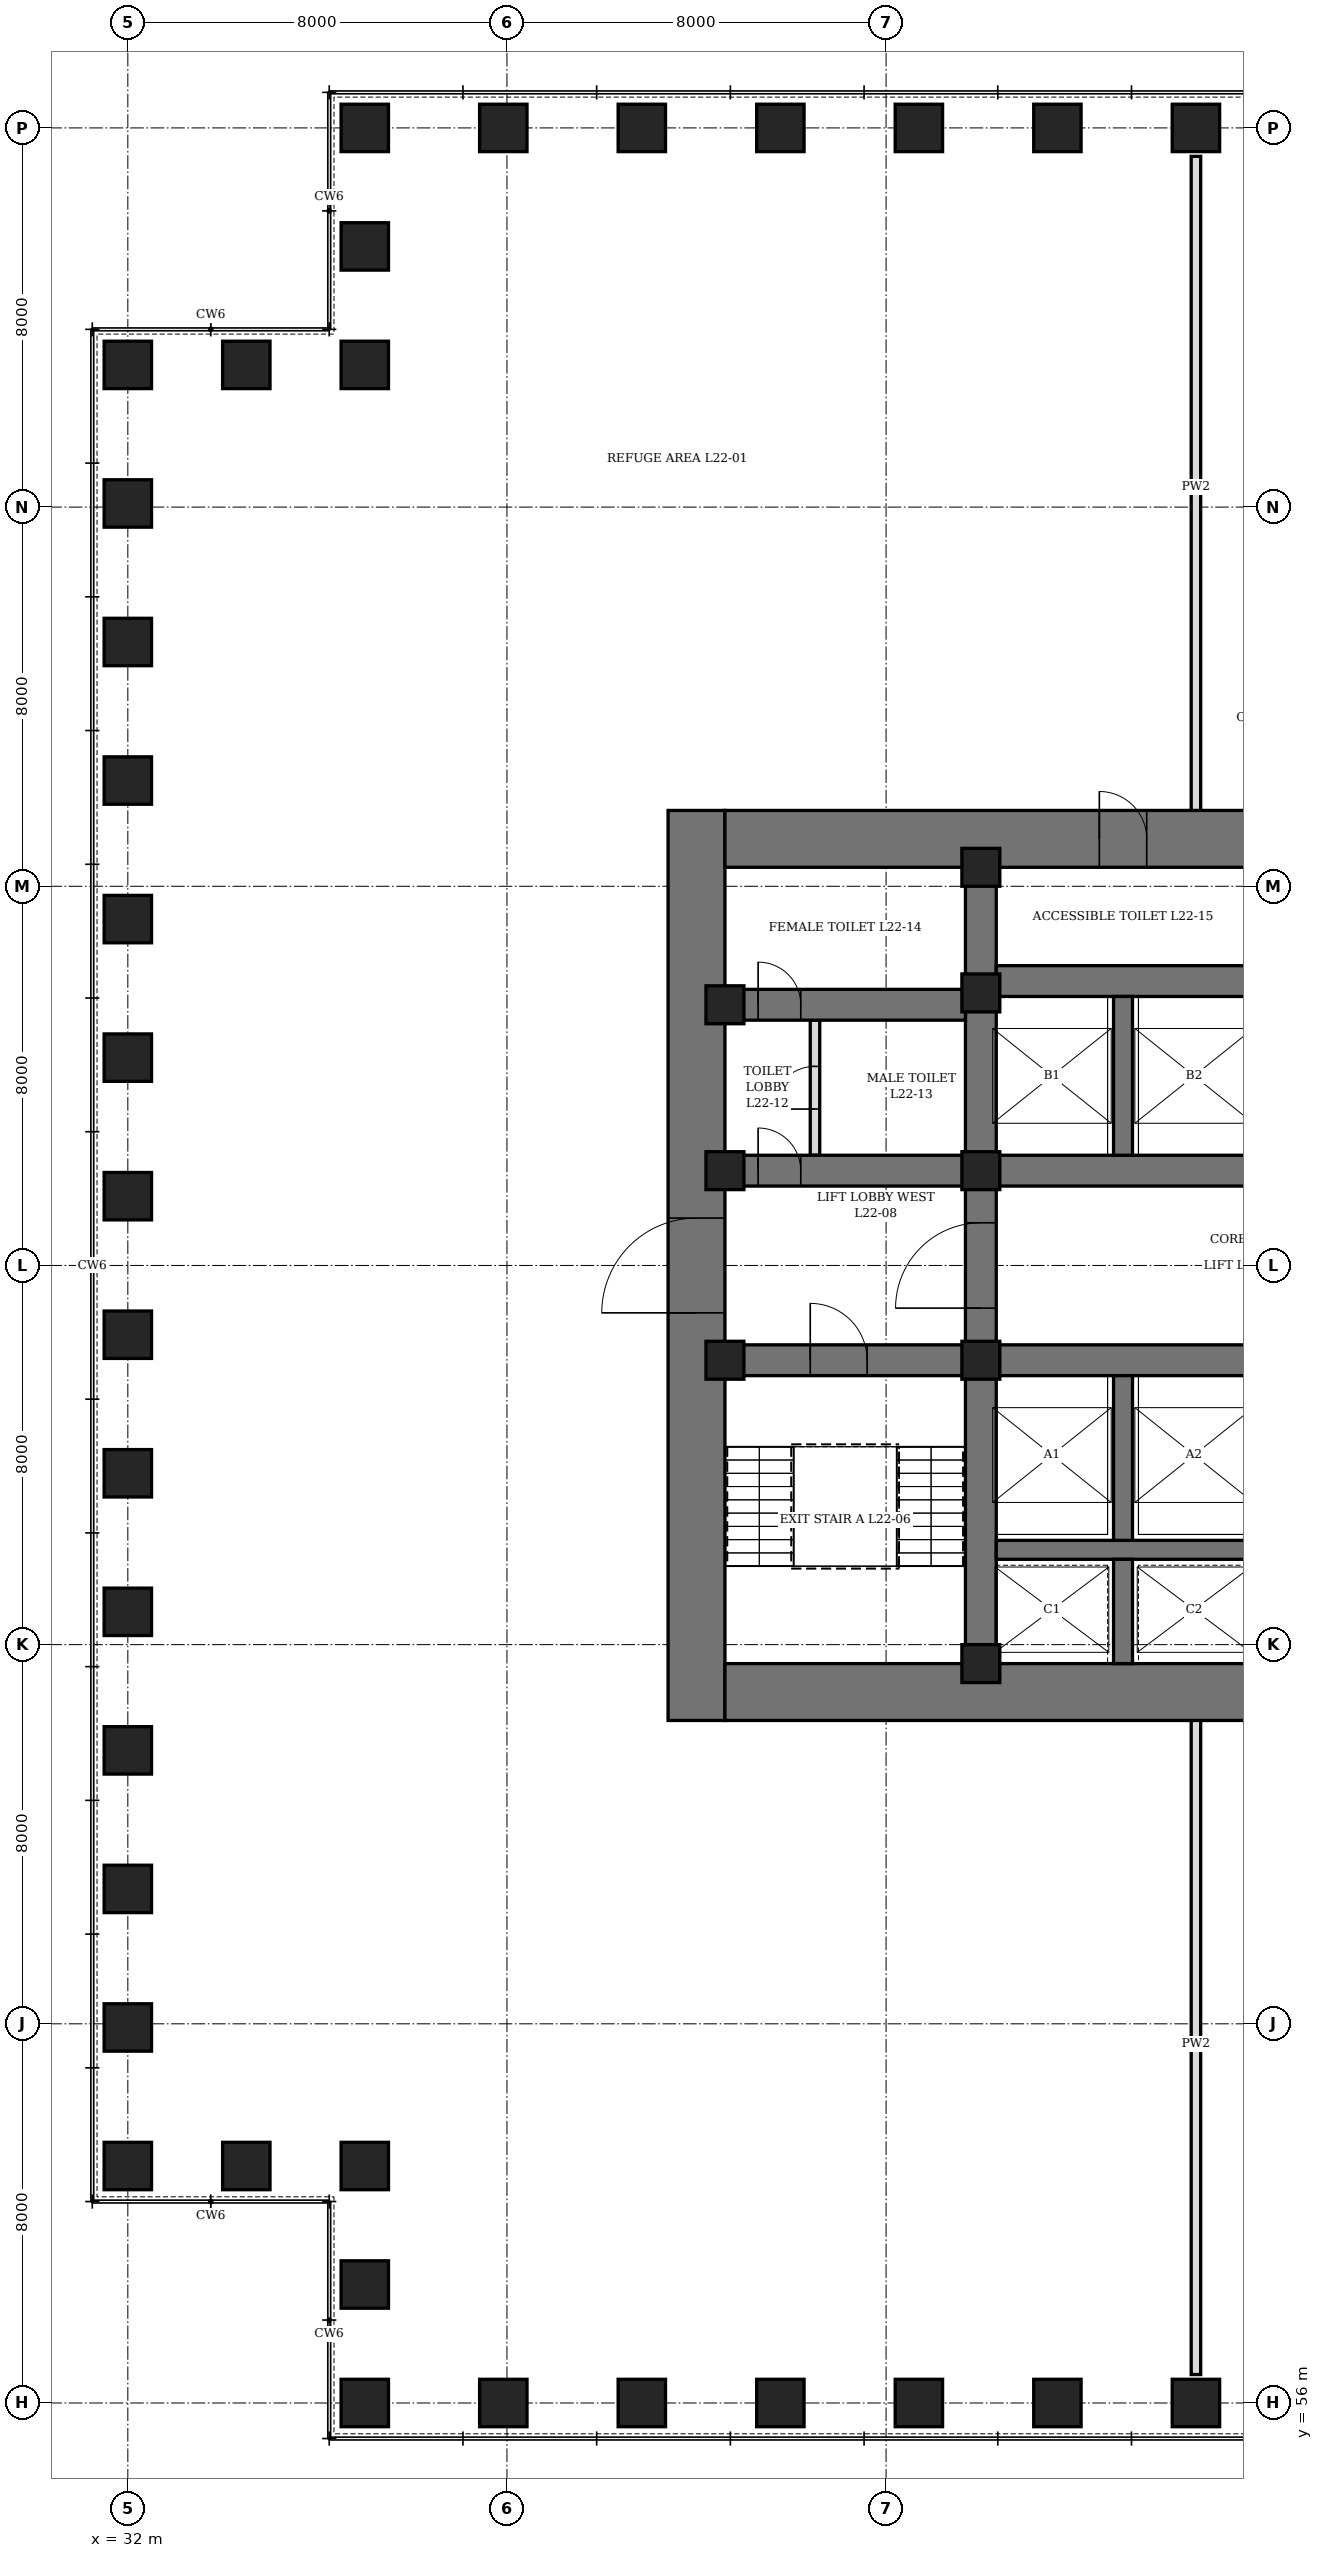
"""IFC4 building model, lengths in metres.
Left out: names, types, materials, properties, quantities, classifications, styles, units other than length and angle.
Written with IfcOpenShell. Run it as: python <this file> out.ifc"""

import sys

from ifc_helpers import new_model, si_unit, direction, frame, frame_2d, origin, origin_2d, place, context, subcontext, project, spatial, rectangle, hollow_rectangle, extrude, element, fill, save


model = new_model("IFC4")
c1 = context("Model", 3, precision=1e-05, world=origin(), true_north=direction((0.0, 1.0)))
c2 = subcontext(c1, "Body", "Model", "MODEL_VIEW")
j1 = project(units=[si_unit("LENGTHUNIT", "METRE"), si_unit("PLANEANGLEUNIT", "RADIAN")], contexts=[c1])
p1 = place(None, origin())
s1 = spatial("IfcSite", under=j1, at=p1, CompositionType="ELEMENT")
p2 = place(p1, origin())
s2 = spatial("IfcBuilding", under=s1, at=p2, CompositionType="ELEMENT")
p3 = place(p2, frame((0.0, 0.0, 102.1)))
s3 = spatial("IfcBuildingStorey", under=s2, at=p3, CompositionType="ELEMENT", Elevation=102.1)
for number, where, z_axis, x_axis in (
    (1, (37.0, 56.0, 0.0), (0.0, 0.0, 1.0), (1.0, 0.0, 0.0)),
    (2, (39.923, 56.0, 0.0), (0.0, 0.0, 1.0), (1.0, 0.0, 0.0)),
    (3, (42.846, 56.0, 0.0), (0.0, 0.0, 1.0), (1.0, 0.0, 0.0)),
    (4, (45.769, 56.0, 0.0), (0.0, 0.0, 1.0), (1.0, 0.0, 0.0)),
    (5, (48.692, 56.0, 0.0), (0.0, 0.0, 1.0), (1.0, 0.0, 0.0)),
    (6, (51.615, 56.0, 0.0), (0.0, 0.0, 1.0), (1.0, 0.0, 0.0)),
    (7, (54.539, 56.0, 0.0), (0.0, 0.0, 1.0), (1.0, 0.0, 0.0)),
    (8, (54.539, 104.0, 0.0), (0.0, 0.0, 1.0), (1.0, 0.0, 0.0)),
    (9, (51.615, 104.0, 0.0), (0.0, 0.0, 1.0), (1.0, 0.0, 0.0)),
    (10, (48.692, 104.0, 0.0), (0.0, 0.0, 1.0), (1.0, 0.0, 0.0)),
    (11, (45.769, 104.0, 0.0), (0.0, 0.0, 1.0), (1.0, 0.0, 0.0)),
    (12, (42.846, 104.0, 0.0), (0.0, 0.0, 1.0), (1.0, 0.0, 0.0)),
    (13, (39.923, 104.0, 0.0), (0.0, 0.0, 1.0), (1.0, 0.0, 0.0)),
    (14, (37.0, 104.0, 0.0), (0.0, 0.0, 1.0), (0.0, 1.0, 0.0)),
    (15, (37.0, 101.5, 0.0), (0.0, 0.0, 1.0), (0.0, 1.0, 0.0)),
    (16, (37.0, 99.0, 0.0), (0.0, 0.0, 1.0), (1.0, 0.0, 0.0)),
    (17, (34.5, 99.0, 0.0), (0.0, 0.0, 1.0), (1.0, 0.0, 0.0)),
    (18, (32.0, 99.0, 0.0), (0.0, 0.0, 1.0), (0.0, 1.0, 0.0)),
    (19, (32.0, 96.077, 0.0), (0.0, 0.0, 1.0), (0.0, 1.0, 0.0)),
    (20, (32.0, 93.154, 0.0), (0.0, 0.0, 1.0), (0.0, 1.0, 0.0)),
    (21, (32.0, 90.231, 0.0), (0.0, 0.0, 1.0), (0.0, 1.0, 0.0)),
    (22, (32.0, 87.308, 0.0), (0.0, 0.0, 1.0), (0.0, 1.0, 0.0)),
    (23, (32.0, 84.385, 0.0), (0.0, 0.0, 1.0), (0.0, 1.0, 0.0)),
    (24, (32.0, 81.461, 0.0), (0.0, 0.0, 1.0), (0.0, 1.0, 0.0)),
    (25, (32.0, 78.539, 0.0), (0.0, 0.0, 1.0), (0.0, 1.0, 0.0)),
    (26, (32.0, 75.615, 0.0), (0.0, 0.0, 1.0), (0.0, 1.0, 0.0)),
    (27, (32.0, 72.692, 0.0), (0.0, 0.0, 1.0), (0.0, 1.0, 0.0)),
    (28, (32.0, 69.769, 0.0), (0.0, 0.0, 1.0), (0.0, 1.0, 0.0)),
    (29, (32.0, 66.846, 0.0), (0.0, 0.0, 1.0), (0.0, 1.0, 0.0)),
    (30, (32.0, 63.923, 0.0), (0.0, 0.0, 1.0), (0.0, 1.0, 0.0)),
    (31, (32.0, 61.0, 0.0), (0.0, 0.0, 1.0), (1.0, 0.0, 0.0)),
    (32, (34.5, 61.0, 0.0), (0.0, 0.0, 1.0), (1.0, 0.0, 0.0)),
    (33, (37.0, 61.0, 0.0), (0.0, 0.0, 1.0), (0.0, 1.0, 0.0)),
    (34, (37.0, 58.5, 0.0), (0.0, 0.0, 1.0), (0.0, 1.0, 0.0)),
):
    element("IfcColumn", number, at=place(p3, frame(where, z_axis=z_axis, x_axis=x_axis)), inside=s3, PredefinedType="COLUMN", context=c2, shape_type="SweptSolid", body=[
        extrude(hollow_rectangle(XDim=1.0, YDim=1.0, WallThickness=0.35, at=origin_2d()), origin(), (0.0, 0.0, 1.0), 5.75),
    ])
p4 = place(p3, frame((44.0, 70.4, 0.0), z_axis=(0.0, 0.0, 1.0), x_axis=(0.0, 1.0, 0.0)))
e35 = element("IfcWall", 35, at=p4, inside=s3, PredefinedType="SHEAR", context=c2, shape_type="SweptSolid", body=[
    extrude(rectangle(XDim=19.2, YDim=1.2, at=frame_2d((9.6, 0.0))), origin(), (0.0, 0.0, 1.0), 6.0),
])
p5 = place(p4, frame((8.6, 0.0, 0.0)))
e36 = element("IfcOpeningElement", 36, at=p5, cuts=e35, PredefinedType="OPENING", context=c2, shape_type="SweptSolid", body=[
    extrude(rectangle(XDim=2.0, YDim=2.4, at=frame_2d((1.0, 1.2))), frame((0.0, 0.61, 0.0), z_axis=(0.0, -1.0, 0.0), x_axis=(1.0, 0.0, 0.0)), (0.0, 0.0, 1.0), 1.22),
])
p6 = place(p3, frame((44.6, 71.0, 0.0), z_axis=(0.0, 0.0, 1.0), x_axis=(1.0, 0.0, 0.0)))
e37 = element("IfcWall", 37, at=p6, inside=s3, PredefinedType="SHEAR", context=c2, shape_type="SweptSolid", body=[
    extrude(rectangle(XDim=22.8, YDim=1.2, at=frame_2d((11.4, 0.0))), origin(), (0.0, 0.0, 1.0), 6.0),
])
p7 = place(p3, frame((44.6, 89.0, 0.0), z_axis=(0.0, 0.0, 1.0), x_axis=(1.0, 0.0, 0.0)))
e38 = element("IfcWall", 38, at=p7, inside=s3, PredefinedType="SHEAR", context=c2, shape_type="SweptSolid", body=[
    extrude(rectangle(XDim=22.8, YDim=1.2, at=frame_2d((11.4, 0.0))), origin(), (0.0, 0.0, 1.0), 6.0),
])
p8 = place(p7, frame((7.9, 0.0, 0.0)))
e39 = element("IfcOpeningElement", 39, at=p8, cuts=e38, PredefinedType="OPENING", context=c2, shape_type="SweptSolid", body=[
    extrude(rectangle(XDim=1.0, YDim=2.1, at=frame_2d((0.5, 1.05))), frame((0.0, 0.61, 0.0), z_axis=(0.0, -1.0, 0.0), x_axis=(1.0, 0.0, 0.0)), (0.0, 0.0, 1.0), 1.22),
])
p9 = place(p7, frame((12.125, 0.0, 0.0)))
e40 = element("IfcOpeningElement", 40, at=p9, cuts=e38, PredefinedType="OPENING", context=c2, shape_type="SweptSolid", body=[
    extrude(rectangle(XDim=0.9, YDim=2.1, at=frame_2d((0.45, 1.05))), frame((0.0, 0.61, 0.0), z_axis=(0.0, -1.0, 0.0), x_axis=(1.0, 0.0, 0.0)), (0.0, 0.0, 1.0), 1.22),
])
p10 = place(p7, frame((14.012, 0.0, 0.0)))
e41 = element("IfcOpeningElement", 41, at=p10, cuts=e38, PredefinedType="OPENING", context=c2, shape_type="SweptSolid", body=[
    extrude(rectangle(XDim=0.9, YDim=2.1, at=frame_2d((0.45, 1.05))), frame((0.0, 0.61, 0.0), z_axis=(0.0, -1.0, 0.0), x_axis=(1.0, 0.0, 0.0)), (0.0, 0.0, 1.0), 1.22),
])
p11 = place(p3, frame((50.0, 71.6, 0.0), z_axis=(0.0, 0.0, 1.0), x_axis=(0.0, 1.0, 0.0)))
e42 = element("IfcWall", 42, at=p11, inside=s3, PredefinedType="SHEAR", context=c2, shape_type="SweptSolid", body=[
    extrude(rectangle(XDim=16.8, YDim=0.65, at=frame_2d((8.4, 0.0))), origin(), (0.0, 0.0, 1.0), 6.0),
])
p12 = place(p11, frame((7.5, 0.0, 0.0)))
e43 = element("IfcOpeningElement", 43, at=p12, cuts=e42, PredefinedType="OPENING", context=c2, shape_type="SweptSolid", body=[
    extrude(rectangle(XDim=1.8, YDim=2.4, at=frame_2d((0.9, 1.2))), frame((0.0, 0.335, 0.0), z_axis=(0.0, -1.0, 0.0), x_axis=(1.0, 0.0, 0.0)), (0.0, 0.0, 1.0), 0.67),
])
p13 = place(p3, frame((44.6, 78.0, 0.0), z_axis=(0.0, 0.0, 1.0), x_axis=(1.0, 0.0, 0.0)))
e44 = element("IfcWall", 44, at=p13, inside=s3, PredefinedType="SHEAR", context=c2, shape_type="SweptSolid", body=[
    extrude(rectangle(XDim=5.075, YDim=0.65, at=frame_2d((2.538, 0.0))), origin(), (0.0, 0.0, 1.0), 6.0),
])
p14 = place(p13, frame((1.8, 0.0, 0.0)))
e45 = element("IfcOpeningElement", 45, at=p14, cuts=e44, PredefinedType="OPENING", context=c2, shape_type="SweptSolid", body=[
    extrude(rectangle(XDim=1.2, YDim=2.1, at=frame_2d((0.6, 1.05))), frame((0.0, 0.335, 0.0), z_axis=(0.0, -1.0, 0.0), x_axis=(1.0, 0.0, 0.0)), (0.0, 0.0, 1.0), 0.67),
])
p15 = place(p3, frame((44.6, 82.0, 0.0), z_axis=(0.0, 0.0, 1.0), x_axis=(1.0, 0.0, 0.0)))
e46 = element("IfcWall", 46, at=p15, inside=s3, PredefinedType="SHEAR", context=c2, shape_type="SweptSolid", body=[
    extrude(rectangle(XDim=5.075, YDim=0.65, at=frame_2d((2.538, 0.0))), origin(), (0.0, 0.0, 1.0), 6.0),
])
p16 = place(p15, frame((0.7, 0.0, 0.0)))
e47 = element("IfcOpeningElement", 47, at=p16, cuts=e46, PredefinedType="OPENING", context=c2, shape_type="SweptSolid", body=[
    extrude(rectangle(XDim=0.9, YDim=2.1, at=frame_2d((0.45, 1.05))), frame((0.0, 0.335, 0.0), z_axis=(0.0, -1.0, 0.0), x_axis=(1.0, 0.0, 0.0)), (0.0, 0.0, 1.0), 0.67),
])
p17 = place(p3, frame((44.6, 85.5, 0.0), z_axis=(0.0, 0.0, 1.0), x_axis=(1.0, 0.0, 0.0)))
e48 = element("IfcWall", 48, at=p17, inside=s3, PredefinedType="SHEAR", context=c2, shape_type="SweptSolid", body=[
    extrude(rectangle(XDim=5.075, YDim=0.65, at=frame_2d((2.538, 0.0))), origin(), (0.0, 0.0, 1.0), 6.0),
])
p18 = place(p17, frame((0.7, 0.0, 0.0)))
e49 = element("IfcOpeningElement", 49, at=p18, cuts=e48, PredefinedType="OPENING", context=c2, shape_type="SweptSolid", body=[
    extrude(rectangle(XDim=0.9, YDim=2.1, at=frame_2d((0.45, 1.05))), frame((0.0, 0.335, 0.0), z_axis=(0.0, -1.0, 0.0), x_axis=(1.0, 0.0, 0.0)), (0.0, 0.0, 1.0), 0.67),
])
for number, where, z_axis, x_axis in (
    (50, (50.325, 78.0, 0.0), (0.0, 0.0, 1.0), (1.0, 0.0, 0.0)),
    (51, (50.325, 82.0, 0.0), (0.0, 0.0, 1.0), (1.0, 0.0, 0.0)),
    (52, (50.325, 86.0, 0.0), (0.0, 0.0, 1.0), (1.0, 0.0, 0.0)),
):
    element("IfcWall", number, at=place(p3, frame(where, z_axis=z_axis, x_axis=x_axis)), inside=s3, PredefinedType="SHEAR", context=c2, shape_type="SweptSolid", body=[
        extrude(rectangle(XDim=11.35, YDim=0.65, at=frame_2d((5.675, 0.0))), origin(), (0.0, 0.0, 1.0), 6.0),
    ])
p19 = place(p3, frame((50.325, 74.0, 0.0), z_axis=(0.0, 0.0, 1.0), x_axis=(1.0, 0.0, 0.0)))
e53 = element("IfcWall", 53, at=p19, inside=s3, PredefinedType="SHEAR", context=c2, shape_type="SweptSolid", body=[
    extrude(rectangle(XDim=11.35, YDim=0.4, at=frame_2d((5.675, 0.0))), origin(), (0.0, 0.0, 1.0), 6.0),
])
p20 = place(p3, frame((53.0, 71.6, 0.0), z_axis=(0.0, 0.0, 1.0), x_axis=(0.0, 1.0, 0.0)))
e54 = element("IfcWall", 54, at=p20, inside=s3, PredefinedType="SHEAR", context=c2, shape_type="SweptSolid", body=[
    extrude(rectangle(XDim=2.2, YDim=0.4, at=frame_2d((1.1, 0.0))), origin(), (0.0, 0.0, 1.0), 6.0),
])
p21 = place(p3, frame((53.0, 74.2, 0.0), z_axis=(0.0, 0.0, 1.0), x_axis=(0.0, 1.0, 0.0)))
e55 = element("IfcWall", 55, at=p21, inside=s3, PredefinedType="SHEAR", context=c2, shape_type="SweptSolid", body=[
    extrude(rectangle(XDim=3.475, YDim=0.4, at=frame_2d((1.738, 0.0))), origin(), (0.0, 0.0, 1.0), 6.0),
])
p22 = place(p3, frame((53.0, 82.325, 0.0), z_axis=(0.0, 0.0, 1.0), x_axis=(0.0, 1.0, 0.0)))
e56 = element("IfcWall", 56, at=p22, inside=s3, PredefinedType="SHEAR", context=c2, shape_type="SweptSolid", body=[
    extrude(rectangle(XDim=3.35, YDim=0.4, at=frame_2d((1.675, 0.0))), origin(), (0.0, 0.0, 1.0), 6.0),
])
for number, where, z_axis, x_axis in (
    (57, (44.6, 78.0, 0.0), (0.0, 0.0, 1.0), (1.0, 0.0, 0.0)),
    (58, (44.6, 82.0, 0.0), (0.0, 0.0, 1.0), (1.0, 0.0, 0.0)),
    (59, (44.6, 85.5, 0.0), (0.0, 0.0, 1.0), (1.0, 0.0, 0.0)),
    (60, (50.0, 71.6, 0.0), (0.0, 0.0, 1.0), (1.0, 0.0, 0.0)),
    (61, (50.0, 78.0, 0.0), (0.0, 0.0, 1.0), (1.0, 0.0, 0.0)),
    (62, (50.0, 82.0, 0.0), (0.0, 0.0, 1.0), (1.0, 0.0, 0.0)),
    (63, (50.0, 85.75, 0.0), (0.0, 0.0, 1.0), (1.0, 0.0, 0.0)),
    (64, (50.0, 88.4, 0.0), (0.0, 0.0, 1.0), (1.0, 0.0, 0.0)),
):
    element("IfcColumn", number, at=place(p3, frame(where, z_axis=z_axis, x_axis=x_axis)), inside=s3, PredefinedType="COLUMN", context=c2, shape_type="SweptSolid", body=[
        extrude(hollow_rectangle(XDim=0.8, YDim=0.8, WallThickness=0.1, at=origin_2d()), origin(), (0.0, 0.0, 1.0), 6.0),
    ])
p23 = place(p3, frame((46.5, 82.325, 0.0), z_axis=(0.0, 0.0, 1.0), x_axis=(0.0, 1.0, 0.0)))
e65 = element("IfcWall", 65, at=p23, inside=s3, PredefinedType="PARTITIONING", context=c2, shape_type="SweptSolid", body=[
    extrude(rectangle(XDim=2.85, YDim=0.2, at=frame_2d((1.425, 0.0))), origin(), (0.0, 0.0, 1.0), 5.75),
])
p24 = place(p23, frame((0.975, 0.0, 0.0)))
e66 = element("IfcOpeningElement", 66, at=p24, cuts=e65, PredefinedType="OPENING", context=c2, shape_type="SweptSolid", body=[
    extrude(rectangle(XDim=0.9, YDim=2.1, at=frame_2d((0.45, 1.05))), frame((0.0, 0.11, 0.0), z_axis=(0.0, -1.0, 0.0), x_axis=(1.0, 0.0, 0.0)), (0.0, 0.0, 1.0), 0.22),
])
for number, where, z_axis, x_axis in (
    (67, (54.539, 89.45, 0.0), (0.0, 0.0, 1.0), (0.0, 1.0, 0.0)),
    (68, (54.539, 56.6, 0.0), (0.0, 0.0, 1.0), (0.0, 1.0, 0.0)),
):
    element("IfcWall", number, at=place(p3, frame(where, z_axis=z_axis, x_axis=x_axis)), inside=s3, PredefinedType="PARTITIONING", context=c2, shape_type="SweptSolid", body=[
        extrude(rectangle(XDim=13.95, YDim=0.2, at=frame_2d((6.975, 0.0))), origin(), (0.0, 0.0, 1.0), 4.25),
    ])
p25 = place(p16, origin())
e69 = element("IfcDoor", 69, at=p25, inside=s3, OperationType="SINGLE_SWING_LEFT", PredefinedType="DOOR", context=c2, shape_type="SweptSolid", body=[
    extrude(rectangle(XDim=0.9, YDim=2.1, at=frame_2d((0.45, 1.05))), frame((0.0, 0.325, 0.0), z_axis=(0.0, -1.0, 0.0), x_axis=(1.0, 0.0, 0.0)), (0.0, 0.0, 1.0), 0.649),
])
fill(e47, e69)
p26 = place(p24, origin())
e70 = element("IfcDoor", 70, at=p26, inside=s3, OperationType="SINGLE_SWING_RIGHT", PredefinedType="DOOR", context=c2, shape_type="SweptSolid", body=[
    extrude(rectangle(XDim=0.9, YDim=2.1, at=frame_2d((0.45, 1.05))), frame((0.0, 0.1, 0.0), z_axis=(0.0, -1.0, 0.0), x_axis=(1.0, 0.0, 0.0)), (0.0, 0.0, 1.0), 0.199),
])
fill(e66, e70)
p27 = place(p18, origin())
e71 = element("IfcDoor", 71, at=p27, inside=s3, OperationType="SINGLE_SWING_RIGHT", PredefinedType="DOOR", context=c2, shape_type="SweptSolid", body=[
    extrude(rectangle(XDim=0.9, YDim=2.1, at=frame_2d((0.45, 1.05))), frame((0.0, 0.325, 0.0), z_axis=(0.0, -1.0, 0.0), x_axis=(1.0, 0.0, 0.0)), (0.0, 0.0, 1.0), 0.649),
])
fill(e49, e71)
p28 = place(p8, origin())
e72 = element("IfcDoor", 72, at=p28, inside=s3, OperationType="SINGLE_SWING_LEFT", PredefinedType="DOOR", context=c2, shape_type="SweptSolid", body=[
    extrude(rectangle(XDim=1.0, YDim=2.1, at=frame_2d((0.5, 1.05))), frame((0.0, 0.35, 0.0), z_axis=(0.0, -1.0, 0.0), x_axis=(1.0, 0.0, 0.0)), (0.0, 0.0, 1.0), 0.7),
])
fill(e39, e72)
p29 = place(p14, origin())
e73 = element("IfcDoor", 73, at=p29, inside=s3, OperationType="SINGLE_SWING_LEFT", PredefinedType="DOOR", context=c2, shape_type="SweptSolid", body=[
    extrude(rectangle(XDim=1.2, YDim=2.1, at=frame_2d((0.6, 1.05))), frame((0.0, 0.325, 0.0), z_axis=(0.0, -1.0, 0.0), x_axis=(1.0, 0.0, 0.0)), (0.0, 0.0, 1.0), 0.649),
])
fill(e45, e73)
p30 = place(p5, origin())
e74 = element("IfcDoor", 74, at=p30, inside=s3, OperationType="DOUBLE_DOOR_SINGLE_SWING", PredefinedType="DOOR", context=c2, shape_type="SweptSolid", body=[
    extrude(rectangle(XDim=2.0, YDim=2.4, at=frame_2d((1.0, 1.2))), frame((0.0, 0.35, 0.0), z_axis=(0.0, -1.0, 0.0), x_axis=(1.0, 0.0, 0.0)), (0.0, 0.0, 1.0), 0.7),
])
fill(e36, e74)
p31 = place(p12, origin())
e75 = element("IfcDoor", 75, at=p31, inside=s3, OperationType="DOUBLE_DOOR_SINGLE_SWING", PredefinedType="DOOR", context=c2, shape_type="SweptSolid", body=[
    extrude(rectangle(XDim=1.8, YDim=2.4, at=frame_2d((0.9, 1.2))), frame((0.0, 0.325, 0.0), z_axis=(0.0, -1.0, 0.0), x_axis=(1.0, 0.0, 0.0)), (0.0, 0.0, 1.0), 0.649),
])
fill(e43, e75)
save(model, sys.argv[1])
